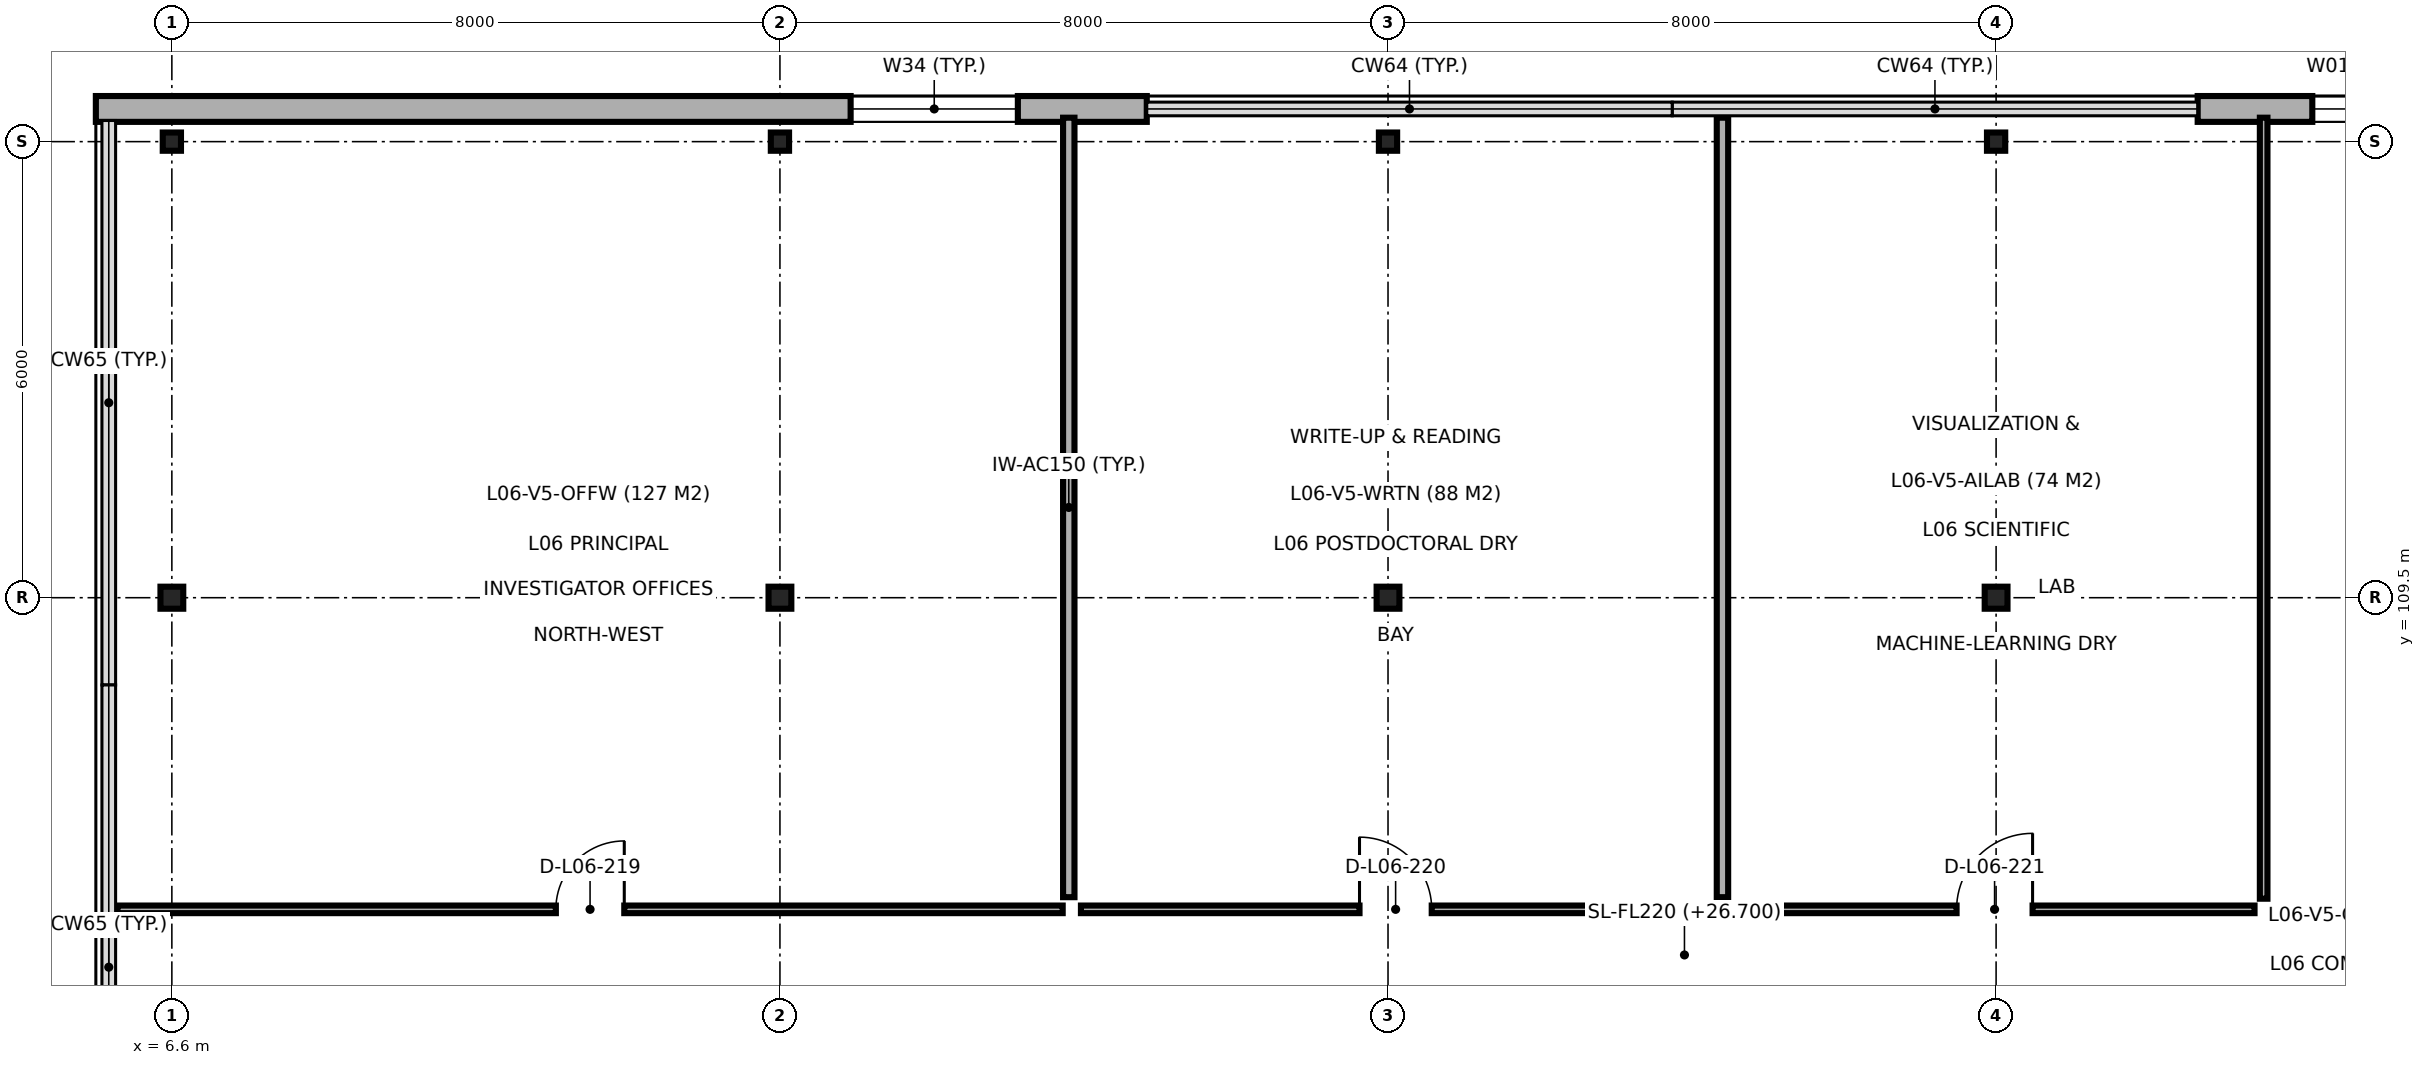
"""IFC4 building model, lengths in metres.
Left out: names, types, materials, properties, quantities, classifications, styles, units other than length and angle.
Written with IfcOpenShell. Run it as: python <this file> out.ifc"""

import sys

from ifc_helpers import new_model, si_unit, direction, frame, frame_2d, origin, origin_2d, place, context, subcontext, project, spatial, rectangle, i_section, extrude, element, fill, save


model = new_model("IFC4")
c1 = context("Model", 3, precision=1e-05, world=origin(), true_north=direction((0.0, 1.0)))
c2 = subcontext(c1, "Body", "Model", "MODEL_VIEW")
j1 = project(units=[si_unit("LENGTHUNIT", "METRE"), si_unit("PLANEANGLEUNIT", "RADIAN")], contexts=[c1])
p1 = place(None, origin())
s1 = spatial("IfcSite", under=j1, at=p1, CompositionType="ELEMENT")
p2 = place(p1, origin())
s2 = spatial("IfcBuilding", under=s1, at=p2, CompositionType="ELEMENT")
p3 = place(p2, frame((0.0, 0.0, 26.7)))
s3 = spatial("IfcBuildingStorey", under=s2, at=p3, CompositionType="ELEMENT", Elevation=26.7)
p4 = place(p3, frame((6.6, 109.5, 0.0), z_axis=(0.0, 0.0, 1.0), x_axis=(1.0, 0.0, 0.0)))
e1 = element("IfcColumn", 1, at=p4, inside=s3, PredefinedType="COLUMN", context=c2, shape_type="SweptSolid", body=[
    extrude(i_section(OverallWidth=0.3, OverallDepth=0.29, WebThickness=0.009, FlangeThickness=0.014, FilletRadius=0.027, at=origin_2d()), origin(), (0.0, 0.0, 1.0), 3.9),
])
p5 = place(p3, frame((6.6, 115.5, 0.0), z_axis=(0.0, 0.0, 1.0), x_axis=(1.0, 0.0, 0.0)))
e2 = element("IfcColumn", 2, at=p5, inside=s3, PredefinedType="COLUMN", context=c2, shape_type="SweptSolid", body=[
    extrude(i_section(OverallWidth=0.24, OverallDepth=0.24, WebThickness=0.01, FlangeThickness=0.017, FilletRadius=0.021, at=origin_2d()), origin(), (0.0, 0.0, 1.0), 3.9),
])
p6 = place(p3, frame((14.6, 109.5, 0.0), z_axis=(0.0, 0.0, 1.0), x_axis=(1.0, 0.0, 0.0)))
e3 = element("IfcColumn", 3, at=p6, inside=s3, PredefinedType="COLUMN", context=c2, shape_type="SweptSolid", body=[
    extrude(i_section(OverallWidth=0.3, OverallDepth=0.29, WebThickness=0.009, FlangeThickness=0.014, FilletRadius=0.027, at=origin_2d()), origin(), (0.0, 0.0, 1.0), 3.9),
])
p7 = place(p3, frame((14.6, 115.5, 0.0), z_axis=(0.0, 0.0, 1.0), x_axis=(1.0, 0.0, 0.0)))
e4 = element("IfcColumn", 4, at=p7, inside=s3, PredefinedType="COLUMN", context=c2, shape_type="SweptSolid", body=[
    extrude(i_section(OverallWidth=0.24, OverallDepth=0.24, WebThickness=0.01, FlangeThickness=0.017, FilletRadius=0.021, at=origin_2d()), origin(), (0.0, 0.0, 1.0), 3.9),
])
p8 = place(p3, frame((22.6, 109.5, 0.0), z_axis=(0.0, 0.0, 1.0), x_axis=(1.0, 0.0, 0.0)))
e5 = element("IfcColumn", 5, at=p8, inside=s3, PredefinedType="COLUMN", context=c2, shape_type="SweptSolid", body=[
    extrude(i_section(OverallWidth=0.3, OverallDepth=0.29, WebThickness=0.009, FlangeThickness=0.014, FilletRadius=0.027, at=origin_2d()), origin(), (0.0, 0.0, 1.0), 3.9),
])
p9 = place(p3, frame((22.6, 115.5, 0.0), z_axis=(0.0, 0.0, 1.0), x_axis=(1.0, 0.0, 0.0)))
e6 = element("IfcColumn", 6, at=p9, inside=s3, PredefinedType="COLUMN", context=c2, shape_type="SweptSolid", body=[
    extrude(i_section(OverallWidth=0.24, OverallDepth=0.24, WebThickness=0.01, FlangeThickness=0.017, FilletRadius=0.021, at=origin_2d()), origin(), (0.0, 0.0, 1.0), 3.9),
])
p10 = place(p3, frame((30.6, 109.5, 0.0), z_axis=(0.0, 0.0, 1.0), x_axis=(1.0, 0.0, 0.0)))
e7 = element("IfcColumn", 7, at=p10, inside=s3, PredefinedType="COLUMN", context=c2, shape_type="SweptSolid", body=[
    extrude(i_section(OverallWidth=0.3, OverallDepth=0.29, WebThickness=0.009, FlangeThickness=0.014, FilletRadius=0.027, at=origin_2d()), origin(), (0.0, 0.0, 1.0), 3.9),
])
p11 = place(p3, frame((30.6, 115.5, 0.0), z_axis=(0.0, 0.0, 1.0), x_axis=(1.0, 0.0, 0.0)))
e8 = element("IfcColumn", 8, at=p11, inside=s3, PredefinedType="COLUMN", context=c2, shape_type="SweptSolid", body=[
    extrude(i_section(OverallWidth=0.24, OverallDepth=0.24, WebThickness=0.01, FlangeThickness=0.017, FilletRadius=0.021, at=origin_2d()), origin(), (0.0, 0.0, 1.0), 3.9),
])
p12 = place(p3, frame((47.078, 115.93, 0.0), z_axis=(0.0, 0.0, 1.0), x_axis=(-1.0, 0.0, 0.0)))
e9 = element("IfcWall", 9, at=p12, inside=s3, PredefinedType="SOLIDWALL", context=c2, shape_type="SweptSolid", body=[
    extrude(rectangle(XDim=13.826, YDim=0.34, at=frame_2d((6.913, 0.0))), origin(), (0.0, 0.0, 1.0), 3.66),
])
p13 = place(p12, frame((9.158, 0.0, 0.9)))
e10 = element("IfcOpeningElement", 10, at=p13, cuts=e9, PredefinedType="OPENING", context=c2, shape_type="SweptSolid", body=[
    extrude(rectangle(XDim=0.9, YDim=1.8, at=frame_2d((0.45, 0.9))), frame((0.0, 0.18, 0.0), z_axis=(0.0, -1.0, 0.0), x_axis=(1.0, 0.0, 0.0)), (0.0, 0.0, 1.0), 0.36),
])
p14 = place(p12, frame((11.118, 0.0, 0.9)))
e11 = element("IfcOpeningElement", 11, at=p14, cuts=e9, PredefinedType="OPENING", context=c2, shape_type="SweptSolid", body=[
    extrude(rectangle(XDim=1.2, YDim=1.8, at=frame_2d((0.6, 0.9))), frame((0.0, 0.18, 0.0), z_axis=(0.0, -1.0, 0.0), x_axis=(1.0, 0.0, 0.0)), (0.0, 0.0, 1.0), 0.36),
])
p15 = place(p3, frame((19.426, 115.93, 0.0), z_axis=(0.0, 0.0, 1.0), x_axis=(-1.0, 0.0, 0.0)))
e12 = element("IfcWall", 12, at=p15, inside=s3, PredefinedType="SOLIDWALL", context=c2, shape_type="SweptSolid", body=[
    extrude(rectangle(XDim=13.826, YDim=0.34, at=frame_2d((6.913, 0.0))), origin(), (0.0, 0.0, 1.0), 3.66),
])
p16 = place(p15, frame((1.696, 0.0, 0.9)))
e13 = element("IfcOpeningElement", 13, at=p16, cuts=e12, PredefinedType="OPENING", context=c2, shape_type="SweptSolid", body=[
    extrude(rectangle(XDim=2.2, YDim=1.65, at=frame_2d((1.1, 0.825))), frame((0.0, 0.18, 0.0), z_axis=(0.0, -1.0, 0.0), x_axis=(1.0, 0.0, 0.0)), (0.0, 0.0, 1.0), 0.36),
])
for number, where, z_axis, x_axis in (
    (14, (18.4, 105.56, 0.0), (0.0, 0.0, 1.0), (0.0, 1.0, 0.0)),
    (15, (27.0, 105.56, 0.0), (0.0, 0.0, 1.0), (0.0, 1.0, 0.0)),
):
    element("IfcWall", number, at=place(p3, frame(where, z_axis=z_axis, x_axis=x_axis)), inside=s3, PredefinedType="PARTITIONING", context=c2, shape_type="SweptSolid", body=[
        extrude(rectangle(XDim=10.255, YDim=0.15, at=frame_2d((5.127, 0.0))), origin(), (0.0, 0.0, 1.0), 3.68),
    ])
p17 = place(p3, frame((34.12, 105.54, 0.0), z_axis=(0.0, 0.0, 1.0), x_axis=(0.0, 1.0, 0.0)))
e16 = element("IfcWall", 16, at=p17, inside=s3, PredefinedType="PARTITIONING", context=c2, shape_type="SweptSolid", body=[
    extrude(rectangle(XDim=10.275, YDim=0.1, at=frame_2d((5.137, 0.0))), origin(), (0.0, 0.0, 1.0), 3.68),
])
p18 = place(p3, frame((5.885, 105.4, 0.0), z_axis=(0.0, 0.0, 1.0), x_axis=(1.0, 0.0, 0.0)))
e17 = element("IfcWall", 17, at=p18, inside=s3, PredefinedType="PARTITIONING", context=c2, shape_type="SweptSolid", body=[
    extrude(rectangle(XDim=12.435, YDim=0.1, at=frame_2d((6.218, 0.0))), origin(), (0.0, 0.0, 1.0), 3.68),
])
p19 = place(p18, frame((5.767, 0.0, 0.0)))
e18 = element("IfcOpeningElement", 18, at=p19, cuts=e17, PredefinedType="OPENING", context=c2, shape_type="SweptSolid", body=[
    extrude(rectangle(XDim=0.9, YDim=2.1, at=frame_2d((0.45, 1.05))), frame((0.0, 0.06, 0.0), z_axis=(0.0, -1.0, 0.0), x_axis=(1.0, 0.0, 0.0)), (0.0, 0.0, 1.0), 0.12),
])
p20 = place(p3, frame((18.56, 105.4, 0.0), z_axis=(0.0, 0.0, 1.0), x_axis=(1.0, 0.0, 0.0)))
e19 = element("IfcWall", 19, at=p20, inside=s3, PredefinedType="PARTITIONING", context=c2, shape_type="SweptSolid", body=[
    extrude(rectangle(XDim=8.28, YDim=0.1, at=frame_2d((4.14, 0.0))), origin(), (0.0, 0.0, 1.0), 3.68),
])
p21 = place(p20, frame((3.665, 0.0, 0.0)))
e20 = element("IfcOpeningElement", 20, at=p21, cuts=e19, PredefinedType="OPENING", context=c2, shape_type="SweptSolid", body=[
    extrude(rectangle(XDim=0.95, YDim=2.1, at=frame_2d((0.475, 1.05))), frame((0.0, 0.06, 0.0), z_axis=(0.0, -1.0, 0.0), x_axis=(1.0, 0.0, 0.0)), (0.0, 0.0, 1.0), 0.12),
])
p22 = place(p3, frame((27.16, 105.4, 0.0), z_axis=(0.0, 0.0, 1.0), x_axis=(1.0, 0.0, 0.0)))
e21 = element("IfcWall", 21, at=p22, inside=s3, PredefinedType="PARTITIONING", context=c2, shape_type="SweptSolid", body=[
    extrude(rectangle(XDim=6.84, YDim=0.1, at=frame_2d((3.42, 0.0))), origin(), (0.0, 0.0, 1.0), 3.68),
])
p23 = place(p22, frame((2.92, 0.0, 0.0)))
e22 = element("IfcOpeningElement", 22, at=p23, cuts=e21, PredefinedType="OPENING", context=c2, shape_type="SweptSolid", body=[
    extrude(rectangle(XDim=1.0, YDim=2.15, at=frame_2d((0.5, 1.075))), frame((0.0, 0.06, 0.0), z_axis=(0.0, -1.0, 0.0), x_axis=(1.0, 0.0, 0.0)), (0.0, 0.0, 1.0), 0.12),
])
p24 = place(p14, origin())
e23 = element("IfcWindow", 23, at=p24, inside=s3, PartitioningType="SINGLE_PANEL", PredefinedType="WINDOW", context=c2, shape_type="SweptSolid", body=[
    extrude(rectangle(XDim=1.2, YDim=1.8, at=frame_2d((0.6, 0.9))), frame((0.0, 0.03, 0.0), z_axis=(0.0, -1.0, 0.0), x_axis=(1.0, 0.0, 0.0)), (0.0, 0.0, 1.0), 0.06),
])
fill(e11, e23)
p25 = place(p16, origin())
e24 = element("IfcWindow", 24, at=p25, inside=s3, PartitioningType="SINGLE_PANEL", PredefinedType="WINDOW", context=c2, shape_type="SweptSolid", body=[
    extrude(rectangle(XDim=2.2, YDim=1.65, at=frame_2d((1.1, 0.825))), frame((0.0, 0.03, 0.0), z_axis=(0.0, -1.0, 0.0), x_axis=(1.0, 0.0, 0.0)), (0.0, 0.0, 1.0), 0.06),
])
fill(e13, e24)
p26 = place(p19, origin())
e25 = element("IfcDoor", 25, at=p26, inside=s3, OperationType="SINGLE_SWING_RIGHT", PredefinedType="DOOR", context=c2, shape_type="SweptSolid", body=[
    extrude(rectangle(XDim=0.9, YDim=2.1, at=frame_2d((0.45, 1.05))), frame((0.0, 0.025, 0.0), z_axis=(0.0, -1.0, 0.0), x_axis=(1.0, 0.0, 0.0)), (0.0, 0.0, 1.0), 0.05),
])
fill(e18, e25)
p27 = place(p21, origin())
e26 = element("IfcDoor", 26, at=p27, inside=s3, OperationType="SINGLE_SWING_LEFT", PredefinedType="DOOR", context=c2, shape_type="SweptSolid", body=[
    extrude(rectangle(XDim=0.95, YDim=2.1, at=frame_2d((0.475, 1.05))), frame((0.0, 0.025, 0.0), z_axis=(0.0, -1.0, 0.0), x_axis=(1.0, 0.0, 0.0)), (0.0, 0.0, 1.0), 0.05),
])
fill(e20, e26)
p28 = place(p23, origin())
e27 = element("IfcDoor", 27, at=p28, inside=s3, OperationType="SINGLE_SWING_RIGHT", PredefinedType="DOOR", context=c2, shape_type="SweptSolid", body=[
    extrude(rectangle(XDim=1.0, YDim=2.15, at=frame_2d((0.5, 1.075))), frame((0.0, 0.025, 0.0), z_axis=(0.0, -1.0, 0.0), x_axis=(1.0, 0.0, 0.0)), (0.0, 0.0, 1.0), 0.05),
])
fill(e22, e27)
save(model, sys.argv[1])
